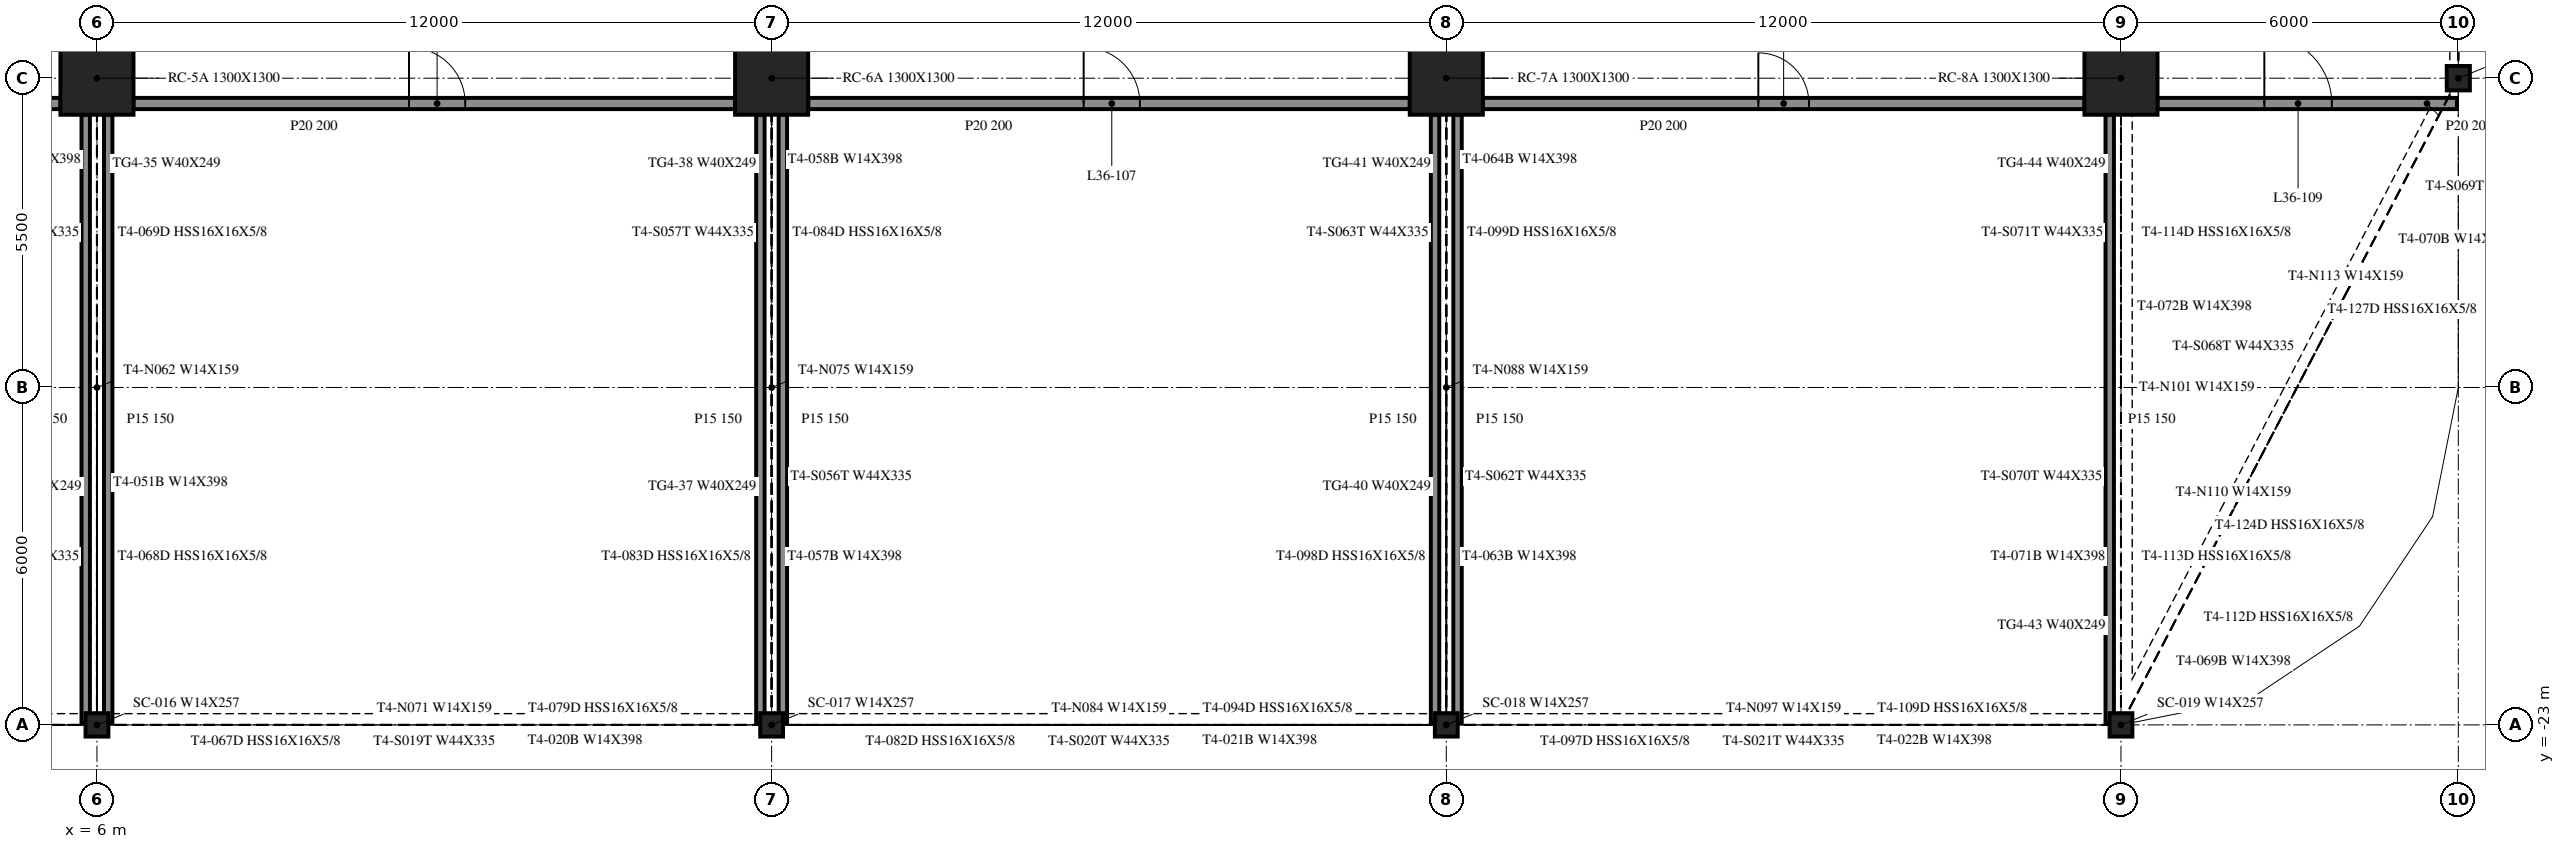
"""IFC4 building model, lengths in metres.
Left out: names, types, materials, properties, quantities, classifications, styles, units other than length and angle.
Written with IfcOpenShell. Run it as: python <this file> out.ifc"""

import sys

from ifc_helpers import new_model, si_unit, direction, frame, frame_2d, origin, origin_2d, place, context, subcontext, project, spatial, rectangle, i_section, extrude, element, fill, save


model = new_model("IFC4")
c1 = context("Model", 3, precision=1e-05, world=origin(), true_north=direction((0.0, 1.0)))
c2 = subcontext(c1, "Body", "Model", "MODEL_VIEW")
j1 = project(units=[si_unit("LENGTHUNIT", "METRE"), si_unit("PLANEANGLEUNIT", "RADIAN")], contexts=[c1])
p1 = place(None, origin())
s1 = spatial("IfcSite", under=j1, at=p1, CompositionType="ELEMENT")
p2 = place(p1, origin())
s2 = spatial("IfcBuilding", under=s1, at=p2, CompositionType="ELEMENT")
p3 = place(p2, frame((0.0, 0.0, 154.8)))
s3 = spatial("IfcBuildingStorey", under=s2, at=p3, CompositionType="ELEMENT", Elevation=154.8)
for number, where, z_axis, x_axis in (
    (1, (6.0, -11.5, -0.55), (0.0, 0.0, 1.0), (1.0, 0.0, 0.0)),
    (2, (18.0, -11.5, -0.55), (0.0, 0.0, 1.0), (1.0, 0.0, 0.0)),
    (3, (30.0, -11.5, -0.55), (0.0, 0.0, 1.0), (1.0, 0.0, 0.0)),
    (4, (42.0, -11.5, -0.55), (0.0, 0.0, 1.0), (1.0, 0.0, 0.0)),
):
    element("IfcColumn", number, at=place(p3, frame(where, z_axis=z_axis, x_axis=x_axis)), inside=s3, PredefinedType="COLUMN", context=c2, shape_type="SweptSolid", body=[
        extrude(rectangle(XDim=1.3, YDim=1.3, at=origin_2d()), origin(), (0.0, 0.0, 1.0), 4.61),
    ])
p4 = place(p3, frame((48.0, -11.5, -0.55), z_axis=(0.0, 0.0, 1.0), x_axis=(1.0, 0.0, 0.0)))
e5 = element("IfcColumn", 5, at=p4, inside=s3, PredefinedType="COLUMN", context=c2, shape_type="SweptSolid", body=[
    extrude(i_section(OverallWidth=0.412, OverallDepth=0.434, WebThickness=0.036, FlangeThickness=0.057, at=origin_2d()), origin(), (0.0, 0.0, 1.0), 4.61),
])
for number, where, z_axis, x_axis in (
    (6, (6.0, -23.0, -0.55), (0.0, 0.0, 1.0), (1.0, 0.0, 0.0)),
    (7, (18.0, -23.0, -0.55), (0.0, 0.0, 1.0), (1.0, 0.0, 0.0)),
    (8, (30.0, -23.0, -0.55), (0.0, 0.0, 1.0), (1.0, 0.0, 0.0)),
    (9, (42.0, -23.0, -0.55), (0.0, 0.0, 1.0), (1.0, 0.0, 0.0)),
):
    element("IfcColumn", number, at=place(p3, frame(where, z_axis=z_axis, x_axis=x_axis)), inside=s3, PredefinedType="COLUMN", context=c2, shape_type="SweptSolid", body=[
        extrude(i_section(OverallWidth=0.406, OverallDepth=0.417, WebThickness=0.03, FlangeThickness=0.048, at=origin_2d()), origin(), (0.0, 0.0, 1.0), 4.61),
    ])
p5 = place(p3, frame((-5.35, -11.95, 0.0), z_axis=(0.0, 0.0, 1.0), x_axis=(1.0, 0.0, 0.0)))
e10 = element("IfcWall", 10, at=p5, inside=s3, PredefinedType="PARTITIONING", context=c2, shape_type="SweptSolid", body=[
    extrude(rectangle(XDim=10.7, YDim=0.2, at=frame_2d((5.35, 0.0))), origin(), (0.0, 0.0, 1.0), 4.06),
])
p6 = place(p5, frame((4.7, 0.0, 0.0)))
e11 = element("IfcOpeningElement", 11, at=p6, cuts=e10, PredefinedType="OPENING", context=c2, shape_type="SweptSolid", body=[
    extrude(rectangle(XDim=1.2, YDim=2.1, at=frame_2d((0.6, 1.05))), frame((0.0, 0.11, 0.0), z_axis=(0.0, -1.0, 0.0), x_axis=(1.0, 0.0, 0.0)), (0.0, 0.0, 1.0), 0.22),
])
p7 = place(p3, frame((6.65, -11.95, 0.0), z_axis=(0.0, 0.0, 1.0), x_axis=(1.0, 0.0, 0.0)))
e12 = element("IfcWall", 12, at=p7, inside=s3, PredefinedType="PARTITIONING", context=c2, shape_type="SweptSolid", body=[
    extrude(rectangle(XDim=10.7, YDim=0.2, at=frame_2d((5.35, 0.0))), origin(), (0.0, 0.0, 1.0), 4.06),
])
p8 = place(p7, frame((4.9, 0.0, 0.0)))
e13 = element("IfcOpeningElement", 13, at=p8, cuts=e12, PredefinedType="OPENING", context=c2, shape_type="SweptSolid", body=[
    extrude(rectangle(XDim=1.0, YDim=2.1, at=frame_2d((0.5, 1.05))), frame((0.0, 0.11, 0.0), z_axis=(0.0, -1.0, 0.0), x_axis=(1.0, 0.0, 0.0)), (0.0, 0.0, 1.0), 0.22),
])
p9 = place(p3, frame((18.65, -11.95, 0.0), z_axis=(0.0, 0.0, 1.0), x_axis=(1.0, 0.0, 0.0)))
e14 = element("IfcWall", 14, at=p9, inside=s3, PredefinedType="PARTITIONING", context=c2, shape_type="SweptSolid", body=[
    extrude(rectangle(XDim=10.7, YDim=0.2, at=frame_2d((5.35, 0.0))), origin(), (0.0, 0.0, 1.0), 4.06),
])
p10 = place(p9, frame((4.9, 0.0, 0.0)))
e15 = element("IfcOpeningElement", 15, at=p10, cuts=e14, PredefinedType="OPENING", context=c2, shape_type="SweptSolid", body=[
    extrude(rectangle(XDim=1.0, YDim=2.1, at=frame_2d((0.5, 1.05))), frame((0.0, 0.11, 0.0), z_axis=(0.0, -1.0, 0.0), x_axis=(1.0, 0.0, 0.0)), (0.0, 0.0, 1.0), 0.22),
])
p11 = place(p3, frame((30.65, -11.95, 0.0), z_axis=(0.0, 0.0, 1.0), x_axis=(1.0, 0.0, 0.0)))
e16 = element("IfcWall", 16, at=p11, inside=s3, PredefinedType="PARTITIONING", context=c2, shape_type="SweptSolid", body=[
    extrude(rectangle(XDim=10.7, YDim=0.2, at=frame_2d((5.35, 0.0))), origin(), (0.0, 0.0, 1.0), 4.06),
])
p12 = place(p11, frame((4.9, 0.0, 0.0)))
e17 = element("IfcOpeningElement", 17, at=p12, cuts=e16, PredefinedType="OPENING", context=c2, shape_type="SweptSolid", body=[
    extrude(rectangle(XDim=0.9, YDim=2.1, at=frame_2d((0.45, 1.05))), frame((0.0, 0.11, 0.0), z_axis=(0.0, -1.0, 0.0), x_axis=(1.0, 0.0, 0.0)), (0.0, 0.0, 1.0), 0.22),
])
p13 = place(p3, frame((42.65, -11.95, 0.0), z_axis=(0.0, 0.0, 1.0), x_axis=(1.0, 0.0, 0.0)))
e18 = element("IfcWall", 18, at=p13, inside=s3, PredefinedType="PARTITIONING", context=c2, shape_type="SweptSolid", body=[
    extrude(rectangle(XDim=5.325, YDim=0.2, at=frame_2d((2.663, 0.0))), origin(), (0.0, 0.0, 1.0), 4.06),
])
p14 = place(p13, frame((1.9, 0.0, 0.0)))
e19 = element("IfcOpeningElement", 19, at=p14, cuts=e18, PredefinedType="OPENING", context=c2, shape_type="SweptSolid", body=[
    extrude(rectangle(XDim=1.2, YDim=2.1, at=frame_2d((0.6, 1.05))), frame((0.0, 0.11, 0.0), z_axis=(0.0, -1.0, 0.0), x_axis=(1.0, 0.0, 0.0)), (0.0, 0.0, 1.0), 0.22),
])
for number, where, z_axis, x_axis in (
    (20, (5.8, -22.975, 0.0), (0.0, 0.0, 1.0), (0.0, 1.0, 0.0)),
    (21, (6.2, -22.975, 0.0), (0.0, 0.0, 1.0), (0.0, 1.0, 0.0)),
    (22, (17.8, -22.975, 0.0), (0.0, 0.0, 1.0), (0.0, 1.0, 0.0)),
    (23, (18.2, -22.975, 0.0), (0.0, 0.0, 1.0), (0.0, 1.0, 0.0)),
    (24, (29.8, -22.975, 0.0), (0.0, 0.0, 1.0), (0.0, 1.0, 0.0)),
    (25, (30.2, -22.975, 0.0), (0.0, 0.0, 1.0), (0.0, 1.0, 0.0)),
    (26, (41.8, -22.975, 0.0), (0.0, 0.0, 1.0), (0.0, 1.0, 0.0)),
):
    element("IfcWall", number, at=place(p3, frame(where, z_axis=z_axis, x_axis=x_axis)), inside=s3, PredefinedType="PARTITIONING", context=c2, shape_type="SweptSolid", body=[
        extrude(rectangle(XDim=10.825, YDim=0.15, at=frame_2d((5.413, 0.0))), origin(), (0.0, 0.0, 1.0), 4.06),
    ])
p15 = place(p8, origin())
e27 = element("IfcDoor", 27, at=p15, inside=s3, OperationType="SINGLE_SWING_LEFT", PredefinedType="DOOR", context=c2, shape_type="SweptSolid", body=[
    extrude(rectangle(XDim=1.0, YDim=2.1, at=frame_2d((0.5, 1.05))), frame((0.0, 0.025, 0.0), z_axis=(0.0, -1.0, 0.0), x_axis=(1.0, 0.0, 0.0)), (0.0, 0.0, 1.0), 0.05),
])
fill(e13, e27)
p16 = place(p10, origin())
e28 = element("IfcDoor", 28, at=p16, inside=s3, OperationType="SINGLE_SWING_LEFT", PredefinedType="DOOR", context=c2, shape_type="SweptSolid", body=[
    extrude(rectangle(XDim=1.0, YDim=2.1, at=frame_2d((0.5, 1.05))), frame((0.0, 0.025, 0.0), z_axis=(0.0, -1.0, 0.0), x_axis=(1.0, 0.0, 0.0)), (0.0, 0.0, 1.0), 0.05),
])
fill(e15, e28)
p17 = place(p12, origin())
e29 = element("IfcDoor", 29, at=p17, inside=s3, OperationType="SINGLE_SWING_RIGHT", PredefinedType="DOOR", context=c2, shape_type="SweptSolid", body=[
    extrude(rectangle(XDim=0.9, YDim=2.1, at=frame_2d((0.45, 1.05))), frame((0.0, 0.025, 0.0), z_axis=(0.0, -1.0, 0.0), x_axis=(1.0, 0.0, 0.0)), (0.0, 0.0, 1.0), 0.05),
])
fill(e17, e29)
p18 = place(p14, origin())
e30 = element("IfcDoor", 30, at=p18, inside=s3, OperationType="SINGLE_SWING_LEFT", PredefinedType="DOOR", context=c2, shape_type="SweptSolid", body=[
    extrude(rectangle(XDim=1.2, YDim=2.1, at=frame_2d((0.6, 1.05))), frame((0.0, 0.025, 0.0), z_axis=(0.0, -1.0, 0.0), x_axis=(1.0, 0.0, 0.0)), (0.0, 0.0, 1.0), 0.05),
])
fill(e19, e30)
save(model, sys.argv[1])
